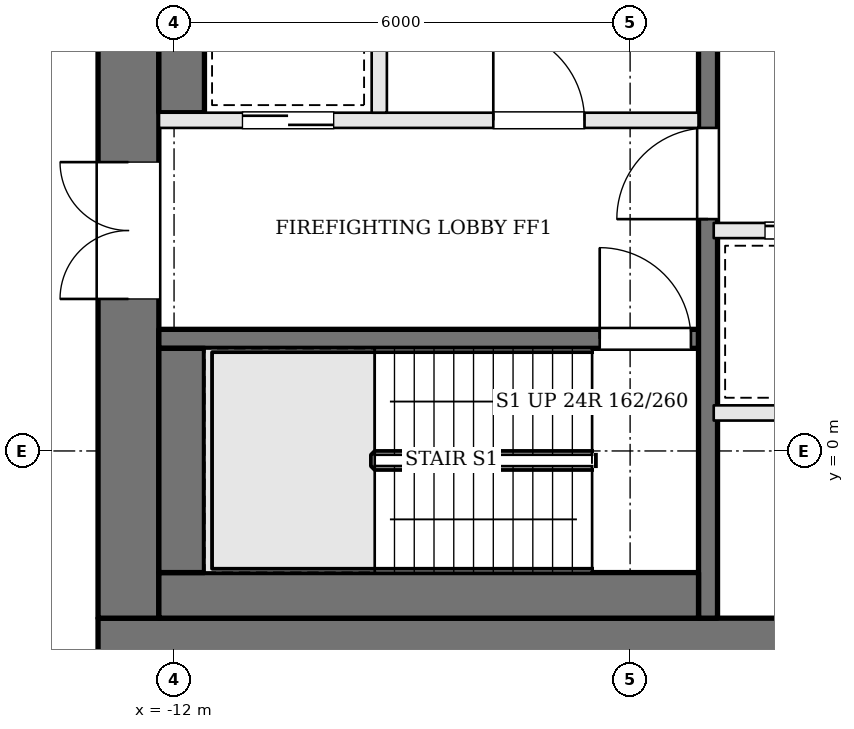
"""IFC4 building model, lengths in metres.
Left out: names, types, materials, properties, quantities, classifications, styles, units other than length and angle.
Written with IfcOpenShell. Run it as: python <this file> out.ifc"""

import sys

from ifc_helpers import new_model, si_unit, direction, frame, frame_2d, origin, place, context, subcontext, project, spatial, rectangle, extrude, element, fill, save


model = new_model("IFC4")
c1 = context("Model", 3, precision=1e-05, world=origin(), true_north=direction((0.0, 1.0)))
c2 = subcontext(c1, "Body", "Model", "MODEL_VIEW")
j1 = project(units=[si_unit("LENGTHUNIT", "METRE"), si_unit("PLANEANGLEUNIT", "RADIAN")], contexts=[c1])
p1 = place(None, origin())
s1 = spatial("IfcSite", under=j1, at=p1, CompositionType="ELEMENT")
p2 = place(p1, origin())
s2 = spatial("IfcBuilding", under=s1, at=p2, CompositionType="ELEMENT")
p3 = place(p2, frame((0.0, 0.0, 177.9)))
s3 = spatial("IfcBuildingStorey", under=s2, at=p3, CompositionType="ELEMENT", Elevation=177.9)
p4 = place(p3, frame((-13.0, -2.6, 0.0), z_axis=(0.0, 0.0, 1.0), x_axis=(1.0, 0.0, 0.0)))
e1 = element("IfcWall", 1, at=p4, inside=s3, PredefinedType="SHEAR", context=c2, shape_type="SweptSolid", body=[
    extrude(rectangle(XDim=26.0, YDim=0.8, at=frame_2d((13.0, 0.0))), origin(), (0.0, 0.0, 1.0), 3.9),
])
p5 = place(p4, frame((8.925, 0.0, 0.0)))
e2 = element("IfcOpeningElement", 2, at=p5, cuts=e1, PredefinedType="OPENING", context=c2, shape_type="SweptSolid", body=[
    extrude(rectangle(XDim=0.9, YDim=2.1, at=frame_2d((0.45, 1.05))), frame((0.0, 0.41, 0.0), z_axis=(0.0, -1.0, 0.0), x_axis=(1.0, 0.0, 0.0)), (0.0, 0.0, 1.0), 0.82),
])
p6 = place(p4, frame((11.475, 0.0, 0.0)))
e3 = element("IfcOpeningElement", 3, at=p6, cuts=e1, PredefinedType="OPENING", context=c2, shape_type="SweptSolid", body=[
    extrude(rectangle(XDim=0.9, YDim=2.1, at=frame_2d((0.45, 1.05))), frame((0.0, 0.41, 0.0), z_axis=(0.0, -1.0, 0.0), x_axis=(1.0, 0.0, 0.0)), (0.0, 0.0, 1.0), 0.82),
])
p7 = place(p4, frame((13.6, 0.0, 0.0)))
e4 = element("IfcOpeningElement", 4, at=p7, cuts=e1, PredefinedType="OPENING", context=c2, shape_type="SweptSolid", body=[
    extrude(rectangle(XDim=1.0, YDim=2.1, at=frame_2d((0.5, 1.05))), frame((0.0, 0.41, 0.0), z_axis=(0.0, -1.0, 0.0), x_axis=(1.0, 0.0, 0.0)), (0.0, 0.0, 1.0), 0.82),
])
p8 = place(p4, frame((15.95, 0.0, 0.0)))
e5 = element("IfcOpeningElement", 5, at=p8, cuts=e1, PredefinedType="OPENING", context=c2, shape_type="SweptSolid", body=[
    extrude(rectangle(XDim=1.0, YDim=2.1, at=frame_2d((0.5, 1.05))), frame((0.0, 0.41, 0.0), z_axis=(0.0, -1.0, 0.0), x_axis=(1.0, 0.0, 0.0)), (0.0, 0.0, 1.0), 0.82),
])
p9 = place(p3, frame((-12.6, -2.2, 0.0), z_axis=(0.0, 0.0, 1.0), x_axis=(0.0, 1.0, 0.0)))
e6 = element("IfcWall", 6, at=p9, inside=s3, PredefinedType="SHEAR", context=c2, shape_type="SweptSolid", body=[
    extrude(rectangle(XDim=13.4, YDim=0.8, at=frame_2d((6.7, 0.0))), origin(), (0.0, 0.0, 1.0), 3.9),
])
p10 = place(p9, frame((4.2, 0.0, 0.0)))
e7 = element("IfcOpeningElement", 7, at=p10, cuts=e6, PredefinedType="OPENING", context=c2, shape_type="SweptSolid", body=[
    extrude(rectangle(XDim=1.8, YDim=2.1, at=frame_2d((0.9, 1.05))), frame((0.0, 0.41, 0.0), z_axis=(0.0, -1.0, 0.0), x_axis=(1.0, 0.0, 0.0)), (0.0, 0.0, 1.0), 0.82),
])
p11 = place(p3, frame((-12.2, 1.475, 0.0), z_axis=(0.0, 0.0, 1.0), x_axis=(1.0, 0.0, 0.0)))
e8 = element("IfcWall", 8, at=p11, inside=s3, PredefinedType="SOLIDWALL", context=c2, shape_type="SweptSolid", body=[
    extrude(rectangle(XDim=7.1, YDim=0.25, at=frame_2d((3.55, 0.0))), origin(), (0.0, 0.0, 1.0), 3.7),
])
p12 = place(p11, frame((5.8, 0.0, 0.0)))
e9 = element("IfcOpeningElement", 9, at=p12, cuts=e8, PredefinedType="OPENING", context=c2, shape_type="SweptSolid", body=[
    extrude(rectangle(XDim=1.2, YDim=2.1, at=frame_2d((0.6, 1.05))), frame((0.0, 0.135, 0.0), z_axis=(0.0, -1.0, 0.0), x_axis=(1.0, 0.0, 0.0)), (0.0, 0.0, 1.0), 0.27),
])
p13 = place(p3, frame((-12.2, 4.35, 0.0), z_axis=(0.0, 0.0, 1.0), x_axis=(1.0, 0.0, 0.0)))
e10 = element("IfcWall", 10, at=p13, inside=s3, PredefinedType="SOLIDWALL", context=c2, shape_type="SweptSolid", body=[
    extrude(rectangle(XDim=7.1, YDim=0.2, at=frame_2d((3.55, 0.0))), origin(), (0.0, 0.0, 1.0), 3.7),
])
p14 = place(p13, frame((4.4, 0.0, 0.0)))
e11 = element("IfcOpeningElement", 11, at=p14, cuts=e10, PredefinedType="OPENING", context=c2, shape_type="SweptSolid", body=[
    extrude(rectangle(XDim=1.2, YDim=2.1, at=frame_2d((0.6, 1.05))), frame((0.0, 0.11, 0.0), z_axis=(0.0, -1.0, 0.0), x_axis=(1.0, 0.0, 0.0)), (0.0, 0.0, 1.0), 0.22),
])
p15 = place(p13, frame((1.1, 0.0, 0.0)))
e12 = element("IfcOpeningElement", 12, at=p15, cuts=e10, PredefinedType="OPENING", context=c2, shape_type="SweptSolid", body=[
    extrude(rectangle(XDim=1.2, YDim=2.1, at=frame_2d((0.6, 1.05))), frame((0.0, 0.11, 0.0), z_axis=(0.0, -1.0, 0.0), x_axis=(1.0, 0.0, 0.0)), (0.0, 0.0, 1.0), 0.22),
])
p16 = place(p3, frame((-9.3, 4.45, 0.0), z_axis=(0.0, 0.0, 1.0), x_axis=(0.0, 1.0, 0.0)))
e13 = element("IfcWall", 13, at=p16, inside=s3, PredefinedType="SOLIDWALL", context=c2, shape_type="SweptSolid", body=[
    extrude(rectangle(XDim=3.0, YDim=0.2, at=frame_2d((1.5, 0.0))), origin(), (0.0, 0.0, 1.0), 3.7),
])
p17 = place(p3, frame((-4.975, -2.2, 0.0), z_axis=(0.0, 0.0, 1.0), x_axis=(0.0, 1.0, 0.0)))
e14 = element("IfcWall", 14, at=p17, inside=s3, PredefinedType="SOLIDWALL", context=c2, shape_type="SweptSolid", body=[
    extrude(rectangle(XDim=13.4, YDim=0.25, at=frame_2d((6.7, 0.0))), origin(), (0.0, 0.0, 1.0), 3.7),
])
p18 = place(p17, frame((5.25, 0.0, 0.0)))
e15 = element("IfcOpeningElement", 15, at=p18, cuts=e14, PredefinedType="OPENING", context=c2, shape_type="SweptSolid", body=[
    extrude(rectangle(XDim=1.2, YDim=2.1, at=frame_2d((0.6, 1.05))), frame((0.0, 0.135, 0.0), z_axis=(0.0, -1.0, 0.0), x_axis=(1.0, 0.0, 0.0)), (0.0, 0.0, 1.0), 0.27),
])
p19 = place(p3, frame((-12.2, -1.9, 0.0), z_axis=(0.0, 0.0, 1.0), x_axis=(1.0, 0.0, 0.0)))
e16 = element("IfcWall", 16, at=p19, inside=s3, PredefinedType="SOLIDWALL", context=c2, shape_type="SweptSolid", body=[
    extrude(rectangle(XDim=7.1, YDim=0.6, at=frame_2d((3.55, 0.0))), origin(), (0.0, 0.0, 1.0), 3.7),
])
p20 = place(p3, frame((-11.9, -1.6, 0.0), z_axis=(0.0, 0.0, 1.0), x_axis=(0.0, 1.0, 0.0)))
e17 = element("IfcWall", 17, at=p20, inside=s3, PredefinedType="SOLIDWALL", context=c2, shape_type="SweptSolid", body=[
    extrude(rectangle(XDim=2.95, YDim=0.6, at=frame_2d((1.475, 0.0))), origin(), (0.0, 0.0, 1.0), 3.7),
])
p21 = place(p3, frame((-11.9, 4.45, 0.0), z_axis=(0.0, 0.0, 1.0), x_axis=(0.0, 1.0, 0.0)))
e18 = element("IfcWall", 18, at=p21, inside=s3, PredefinedType="SOLIDWALL", context=c2, shape_type="SweptSolid", body=[
    extrude(rectangle(XDim=3.0, YDim=0.6, at=frame_2d((1.5, 0.0))), origin(), (0.0, 0.0, 1.0), 3.7),
])
p22 = place(p3, frame((-4.9, 0.5, 0.0), z_axis=(0.0, 0.0, 1.0), x_axis=(1.0, 0.0, 0.0)))
e19 = element("IfcWall", 19, at=p22, inside=s3, PredefinedType="SOLIDWALL", context=c2, shape_type="SweptSolid", body=[
    extrude(rectangle(XDim=9.8, YDim=0.2, at=frame_2d((4.9, 0.0))), origin(), (0.0, 0.0, 1.0), 3.7),
])
p23 = place(p3, frame((-4.9, 2.9, 0.0), z_axis=(0.0, 0.0, 1.0), x_axis=(1.0, 0.0, 0.0)))
e20 = element("IfcWall", 20, at=p23, inside=s3, PredefinedType="SOLIDWALL", context=c2, shape_type="SweptSolid", body=[
    extrude(rectangle(XDim=9.8, YDim=0.2, at=frame_2d((4.9, 0.0))), origin(), (0.0, 0.0, 1.0), 3.7),
])
p24 = place(p23, frame((0.675, 0.0, 0.0)))
e21 = element("IfcOpeningElement", 21, at=p24, cuts=e20, PredefinedType="OPENING", context=c2, shape_type="SweptSolid", body=[
    extrude(rectangle(XDim=1.1, YDim=2.1, at=frame_2d((0.55, 1.05))), frame((0.0, 0.11, 0.0), z_axis=(0.0, -1.0, 0.0), x_axis=(1.0, 0.0, 0.0)), (0.0, 0.0, 1.0), 0.22),
])
p25 = place(p23, frame((2.613, 0.0, 0.0)))
e22 = element("IfcOpeningElement", 22, at=p25, cuts=e20, PredefinedType="OPENING", context=c2, shape_type="SweptSolid", body=[
    extrude(rectangle(XDim=0.9, YDim=2.1, at=frame_2d((0.45, 1.05))), frame((0.0, 0.11, 0.0), z_axis=(0.0, -1.0, 0.0), x_axis=(1.0, 0.0, 0.0)), (0.0, 0.0, 1.0), 0.22),
])
p26 = place(p23, frame((4.35, 0.0, 0.0)))
e23 = element("IfcOpeningElement", 23, at=p26, cuts=e20, PredefinedType="OPENING", context=c2, shape_type="SweptSolid", body=[
    extrude(rectangle(XDim=1.1, YDim=2.1, at=frame_2d((0.55, 1.05))), frame((0.0, 0.11, 0.0), z_axis=(0.0, -1.0, 0.0), x_axis=(1.0, 0.0, 0.0)), (0.0, 0.0, 1.0), 0.22),
])
p27 = place(p23, frame((7.463, 0.0, 0.0)))
e24 = element("IfcOpeningElement", 24, at=p27, cuts=e20, PredefinedType="OPENING", context=c2, shape_type="SweptSolid", body=[
    extrude(rectangle(XDim=1.0, YDim=2.1, at=frame_2d((0.5, 1.05))), frame((0.0, 0.11, 0.0), z_axis=(0.0, -1.0, 0.0), x_axis=(1.0, 0.0, 0.0)), (0.0, 0.0, 1.0), 0.22),
])
p28 = place(p10, origin())
e25 = element("IfcDoor", 25, at=p28, inside=s3, OperationType="DOUBLE_DOOR_SINGLE_SWING", PredefinedType="DOOR", context=c2, shape_type="SweptSolid", body=[
    extrude(rectangle(XDim=1.8, YDim=2.1, at=frame_2d((0.9, 1.05))), frame((0.0, 0.025, 0.0), z_axis=(0.0, -1.0, 0.0), x_axis=(1.0, 0.0, 0.0)), (0.0, 0.0, 1.0), 0.05),
])
fill(e7, e25)
p29 = place(p18, origin())
e26 = element("IfcDoor", 26, at=p29, inside=s3, OperationType="SINGLE_SWING_LEFT", PredefinedType="DOOR", context=c2, shape_type="SweptSolid", body=[
    extrude(rectangle(XDim=1.2, YDim=2.1, at=frame_2d((0.6, 1.05))), frame((0.0, 0.025, 0.0), z_axis=(0.0, -1.0, 0.0), x_axis=(1.0, 0.0, 0.0)), (0.0, 0.0, 1.0), 0.05),
])
fill(e15, e26)
p30 = place(p14, origin())
e27 = element("IfcDoor", 27, at=p30, inside=s3, OperationType="SINGLE_SWING_LEFT", PredefinedType="DOOR", context=c2, shape_type="SweptSolid", body=[
    extrude(rectangle(XDim=1.2, YDim=2.1, at=frame_2d((0.6, 1.05))), frame((0.0, 0.025, 0.0), z_axis=(0.0, -1.0, 0.0), x_axis=(1.0, 0.0, 0.0)), (0.0, 0.0, 1.0), 0.05),
])
fill(e11, e27)
p31 = place(p12, origin())
e28 = element("IfcDoor", 28, at=p31, inside=s3, OperationType="SINGLE_SWING_LEFT", PredefinedType="DOOR", context=c2, shape_type="SweptSolid", body=[
    extrude(rectangle(XDim=1.2, YDim=2.1, at=frame_2d((0.6, 1.05))), frame((0.0, 0.025, 0.0), z_axis=(0.0, -1.0, 0.0), x_axis=(1.0, 0.0, 0.0)), (0.0, 0.0, 1.0), 0.05),
])
fill(e9, e28)
p32 = place(p15, origin())
e29 = element("IfcDoor", 29, at=p32, inside=s3, OperationType="SLIDING_TO_RIGHT", PredefinedType="DOOR", context=c2, shape_type="SweptSolid", body=[
    extrude(rectangle(XDim=1.2, YDim=2.1, at=frame_2d((0.6, 1.05))), frame((0.0, 0.025, 0.0), z_axis=(0.0, -1.0, 0.0), x_axis=(1.0, 0.0, 0.0)), (0.0, 0.0, 1.0), 0.05),
])
fill(e12, e29)
p33 = place(p24, origin())
e30 = element("IfcDoor", 30, at=p33, inside=s3, OperationType="SLIDING_TO_RIGHT", PredefinedType="DOOR", context=c2, shape_type="SweptSolid", body=[
    extrude(rectangle(XDim=1.1, YDim=2.1, at=frame_2d((0.55, 1.05))), frame((0.0, 0.025, 0.0), z_axis=(0.0, -1.0, 0.0), x_axis=(1.0, 0.0, 0.0)), (0.0, 0.0, 1.0), 0.05),
])
fill(e21, e30)
save(model, sys.argv[1])
